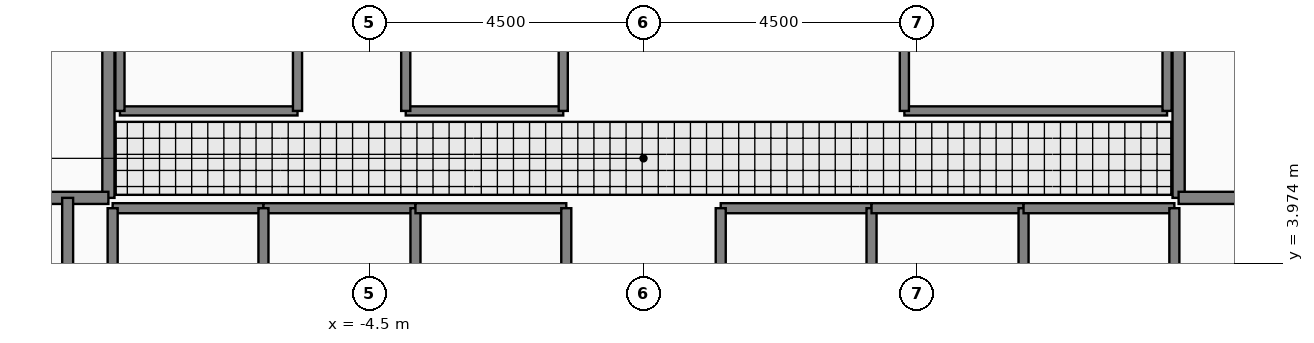
"""IFC4 building model, lengths in metres.
Left out: names, types, materials, properties, quantities, classifications, styles, units other than length and angle.
Written with IfcOpenShell. Run it as: python <this file> out.ifc"""

import sys

from ifc_helpers import new_model, si_unit, direction, frame, frame_2d, origin, place, context, subcontext, project, spatial, rectangle, extrude, element, fill, save


model = new_model("IFC4")
c1 = context("Model", 3, precision=1e-05, world=origin(), true_north=direction((0.0, 1.0)))
c2 = subcontext(c1, "Body", "Model", "MODEL_VIEW")
j1 = project(units=[si_unit("LENGTHUNIT", "METRE"), si_unit("PLANEANGLEUNIT", "RADIAN")], contexts=[c1])
p1 = place(None, origin())
s1 = spatial("IfcSite", under=j1, at=p1, CompositionType="ELEMENT")
p2 = place(p1, origin())
s2 = spatial("IfcBuilding", under=s1, at=p2, CompositionType="ELEMENT")
p3 = place(p2, frame((0.0, 0.0, 27.6)))
s3 = spatial("IfcBuildingStorey", under=s2, at=p3, CompositionType="ELEMENT", Elevation=27.6)
p4 = place(p3, frame((-8.8, 5.05, 0.0), z_axis=(0.0, 0.0, 1.0), x_axis=(0.0, 1.0, 0.0)))
e1 = element("IfcWall", 1, at=p4, inside=s3, PredefinedType="PARTITIONING", context=c2, shape_type="SweptSolid", body=[
    extrude(rectangle(XDim=6.1, YDim=0.2, at=frame_2d((3.05, 0.0))), origin(), (0.0, 0.0, 1.0), 3.43),
])
p5 = place(p4, frame((0.25, 0.0, 0.0)))
e2 = element("IfcOpeningElement", 2, at=p5, cuts=e1, PredefinedType="OPENING", context=c2, shape_type="SweptSolid", body=[
    extrude(rectangle(XDim=1.1, YDim=2.2, at=frame_2d((0.55, 1.1))), frame((0.0, 0.11, 0.0), z_axis=(0.0, -1.0, 0.0), x_axis=(1.0, 0.0, 0.0)), (0.0, 0.0, 1.0), 0.22),
])
p6 = place(p4, frame((3.85, 0.0, 0.0)))
e3 = element("IfcOpeningElement", 3, at=p6, cuts=e1, PredefinedType="OPENING", context=c2, shape_type="SweptSolid", body=[
    extrude(rectangle(XDim=1.1, YDim=2.2, at=frame_2d((0.55, 1.1))), frame((0.0, 0.11, 0.0), z_axis=(0.0, -1.0, 0.0), x_axis=(1.0, 0.0, 0.0)), (0.0, 0.0, 1.0), 0.22),
])
p7 = place(p3, frame((8.8, 11.15, 0.0), z_axis=(0.0, 0.0, 1.0), x_axis=(0.0, -1.0, 0.0)))
e4 = element("IfcWall", 4, at=p7, inside=s3, PredefinedType="PARTITIONING", context=c2, shape_type="SweptSolid", body=[
    extrude(rectangle(XDim=6.1, YDim=0.2, at=frame_2d((3.05, 0.0))), origin(), (0.0, 0.0, 1.0), 3.43),
])
p8 = place(p7, frame((1.15, 0.0, 0.0)))
e5 = element("IfcOpeningElement", 5, at=p8, cuts=e4, PredefinedType="OPENING", context=c2, shape_type="SweptSolid", body=[
    extrude(rectangle(XDim=1.1, YDim=2.2, at=frame_2d((0.55, 1.1))), frame((0.0, 0.11, 0.0), z_axis=(0.0, -1.0, 0.0), x_axis=(1.0, 0.0, 0.0)), (0.0, 0.0, 1.0), 0.22),
])
p9 = place(p7, frame((4.75, 0.0, 0.0)))
e6 = element("IfcOpeningElement", 6, at=p9, cuts=e4, PredefinedType="OPENING", context=c2, shape_type="SweptSolid", body=[
    extrude(rectangle(XDim=1.1, YDim=2.2, at=frame_2d((0.55, 1.1))), frame((0.0, 0.11, 0.0), z_axis=(0.0, -1.0, 0.0), x_axis=(1.0, 0.0, 0.0)), (0.0, 0.0, 1.0), 0.22),
])
p10 = place(p3, frame((-8.73, 4.88, 0.0), z_axis=(0.0, 0.0, 1.0), x_axis=(1.0, 0.0, 0.0)))
e7 = element("IfcWall", 7, at=p10, inside=s3, PredefinedType="PARTITIONING", context=c2, shape_type="SweptSolid", body=[
    extrude(rectangle(XDim=2.48, YDim=0.165, at=frame_2d((1.24, 0.0))), origin(), (0.0, 0.0, 1.0), 3.43),
])
p11 = place(p10, frame((0.69, 0.0, 0.0)))
e8 = element("IfcOpeningElement", 8, at=p11, cuts=e7, PredefinedType="OPENING", context=c2, shape_type="SweptSolid", body=[
    extrude(rectangle(XDim=1.1, YDim=2.25, at=frame_2d((0.55, 1.125))), frame((0.0, 0.093, 0.0), z_axis=(0.0, -1.0, 0.0), x_axis=(1.0, 0.0, 0.0)), (0.0, 0.0, 1.0), 0.185),
])
p12 = place(p3, frame((-6.25, 4.88, 0.0), z_axis=(0.0, 0.0, 1.0), x_axis=(1.0, 0.0, 0.0)))
e9 = element("IfcWall", 9, at=p12, inside=s3, PredefinedType="PARTITIONING", context=c2, shape_type="SweptSolid", body=[
    extrude(rectangle(XDim=2.5, YDim=0.165, at=frame_2d((1.25, 0.0))), origin(), (0.0, 0.0, 1.0), 3.43),
])
p13 = place(p12, frame((0.7, 0.0, 0.0)))
e10 = element("IfcOpeningElement", 10, at=p13, cuts=e9, PredefinedType="OPENING", context=c2, shape_type="SweptSolid", body=[
    extrude(rectangle(XDim=1.1, YDim=2.25, at=frame_2d((0.55, 1.125))), frame((0.0, 0.093, 0.0), z_axis=(0.0, -1.0, 0.0), x_axis=(1.0, 0.0, 0.0)), (0.0, 0.0, 1.0), 0.185),
])
p14 = place(p3, frame((-3.91, 6.48, 0.0), z_axis=(0.0, 0.0, 1.0), x_axis=(1.0, 0.0, 0.0)))
e11 = element("IfcWall", 11, at=p14, inside=s3, PredefinedType="PARTITIONING", context=c2, shape_type="SweptSolid", body=[
    extrude(rectangle(XDim=2.59, YDim=0.15, at=frame_2d((1.295, 0.0))), origin(), (0.0, 0.0, 1.0), 3.43),
])
p15 = place(p14, frame((0.845, 0.0, 0.0)))
e12 = element("IfcOpeningElement", 12, at=p15, cuts=e11, PredefinedType="OPENING", context=c2, shape_type="SweptSolid", body=[
    extrude(rectangle(XDim=0.9, YDim=2.15, at=frame_2d((0.45, 1.075))), frame((0.0, 0.085, 0.0), z_axis=(0.0, -1.0, 0.0), x_axis=(1.0, 0.0, 0.0)), (0.0, 0.0, 1.0), 0.17),
])
p16 = place(p3, frame((4.29, 6.48, 0.0), z_axis=(0.0, 0.0, 1.0), x_axis=(1.0, 0.0, 0.0)))
e13 = element("IfcWall", 13, at=p16, inside=s3, PredefinedType="PARTITIONING", context=c2, shape_type="SweptSolid", body=[
    extrude(rectangle(XDim=4.32, YDim=0.15, at=frame_2d((2.16, 0.0))), origin(), (0.0, 0.0, 1.0), 3.43),
])
p17 = place(p16, frame((1.71, 0.0, 0.0)))
e14 = element("IfcOpeningElement", 14, at=p17, cuts=e13, PredefinedType="OPENING", context=c2, shape_type="SweptSolid", body=[
    extrude(rectangle(XDim=0.9, YDim=2.15, at=frame_2d((0.45, 1.075))), frame((0.0, 0.085, 0.0), z_axis=(0.0, -1.0, 0.0), x_axis=(1.0, 0.0, 0.0)), (0.0, 0.0, 1.0), 0.17),
])
for number, where, z_axis, x_axis in (
    (15, (-11.65, 5.05, 0.0), (0.0, 0.0, 1.0), (1.0, 0.0, 0.0)),
    (16, (8.8, 5.05, 0.0), (0.0, 0.0, 1.0), (1.0, 0.0, 0.0)),
):
    element("IfcWall", number, at=place(p3, frame(where, z_axis=z_axis, x_axis=x_axis)), inside=s3, PredefinedType="PARTITIONING", context=c2, shape_type="SweptSolid", body=[
        extrude(rectangle(XDim=2.85, YDim=0.2, at=frame_2d((1.425, 0.0))), origin(), (0.0, 0.0, 1.0), 3.43),
    ])
for number, where, z_axis, x_axis in (
    (17, (-8.73, 2.52, 0.0), (0.0, 0.0, 1.0), (0.0, 1.0, 0.0)),
    (18, (-6.25, 2.52, 0.0), (0.0, 0.0, 1.0), (0.0, 1.0, 0.0)),
    (19, (-3.75, 2.52, 0.0), (0.0, 0.0, 1.0), (0.0, 1.0, 0.0)),
):
    element("IfcWall", number, at=place(p3, frame(where, z_axis=z_axis, x_axis=x_axis)), inside=s3, PredefinedType="PARTITIONING", context=c2, shape_type="SweptSolid", body=[
        extrude(rectangle(XDim=2.36, YDim=0.165, at=frame_2d((1.18, 0.0))), origin(), (0.0, 0.0, 1.0), 3.43),
    ])
p18 = place(p3, frame((-3.75, 4.88, 0.0), z_axis=(0.0, 0.0, 1.0), x_axis=(1.0, 0.0, 0.0)))
e20 = element("IfcWall", 20, at=p18, inside=s3, PredefinedType="PARTITIONING", context=c2, shape_type="SweptSolid", body=[
    extrude(rectangle(XDim=2.48, YDim=0.165, at=frame_2d((1.24, 0.0))), origin(), (0.0, 0.0, 1.0), 3.43),
])
p19 = place(p3, frame((-1.27, 2.52, 0.0), z_axis=(0.0, 0.0, 1.0), x_axis=(0.0, 1.0, 0.0)))
e21 = element("IfcWall", 21, at=p19, inside=s3, PredefinedType="PARTITIONING", context=c2, shape_type="SweptSolid", body=[
    extrude(rectangle(XDim=2.36, YDim=0.165, at=frame_2d((1.18, 0.0))), origin(), (0.0, 0.0, 1.0), 3.43),
])
p20 = place(p3, frame((1.27, 4.88, 0.0), z_axis=(0.0, 0.0, 1.0), x_axis=(1.0, 0.0, 0.0)))
e22 = element("IfcWall", 22, at=p20, inside=s3, PredefinedType="PARTITIONING", context=c2, shape_type="SweptSolid", body=[
    extrude(rectangle(XDim=2.48, YDim=0.165, at=frame_2d((1.24, 0.0))), origin(), (0.0, 0.0, 1.0), 3.43),
])
for number, where, z_axis, x_axis in (
    (23, (1.27, 2.52, 0.0), (0.0, 0.0, 1.0), (0.0, 1.0, 0.0)),
    (24, (3.75, 2.52, 0.0), (0.0, 0.0, 1.0), (0.0, 1.0, 0.0)),
):
    element("IfcWall", number, at=place(p3, frame(where, z_axis=z_axis, x_axis=x_axis)), inside=s3, PredefinedType="PARTITIONING", context=c2, shape_type="SweptSolid", body=[
        extrude(rectangle(XDim=2.36, YDim=0.165, at=frame_2d((1.18, 0.0))), origin(), (0.0, 0.0, 1.0), 3.43),
    ])
p21 = place(p3, frame((3.75, 4.88, 0.0), z_axis=(0.0, 0.0, 1.0), x_axis=(1.0, 0.0, 0.0)))
e25 = element("IfcWall", 25, at=p21, inside=s3, PredefinedType="PARTITIONING", context=c2, shape_type="SweptSolid", body=[
    extrude(rectangle(XDim=2.5, YDim=0.165, at=frame_2d((1.25, 0.0))), origin(), (0.0, 0.0, 1.0), 3.43),
])
p22 = place(p3, frame((6.25, 2.52, 0.0), z_axis=(0.0, 0.0, 1.0), x_axis=(0.0, 1.0, 0.0)))
e26 = element("IfcWall", 26, at=p22, inside=s3, PredefinedType="PARTITIONING", context=c2, shape_type="SweptSolid", body=[
    extrude(rectangle(XDim=2.36, YDim=0.165, at=frame_2d((1.18, 0.0))), origin(), (0.0, 0.0, 1.0), 3.43),
])
p23 = place(p3, frame((6.25, 4.88, 0.0), z_axis=(0.0, 0.0, 1.0), x_axis=(1.0, 0.0, 0.0)))
e27 = element("IfcWall", 27, at=p23, inside=s3, PredefinedType="PARTITIONING", context=c2, shape_type="SweptSolid", body=[
    extrude(rectangle(XDim=2.48, YDim=0.165, at=frame_2d((1.24, 0.0))), origin(), (0.0, 0.0, 1.0), 3.43),
])
p24 = place(p3, frame((8.73, 2.52, 0.0), z_axis=(0.0, 0.0, 1.0), x_axis=(0.0, 1.0, 0.0)))
e28 = element("IfcWall", 28, at=p24, inside=s3, PredefinedType="PARTITIONING", context=c2, shape_type="SweptSolid", body=[
    extrude(rectangle(XDim=2.36, YDim=0.165, at=frame_2d((1.18, 0.0))), origin(), (0.0, 0.0, 1.0), 3.43),
])
p25 = place(p3, frame((-9.47, 2.45, 0.0), z_axis=(0.0, 0.0, 1.0), x_axis=(0.0, 1.0, 0.0)))
e29 = element("IfcWall", 29, at=p25, inside=s3, PredefinedType="PARTITIONING", context=c2, shape_type="SweptSolid", body=[
    extrude(rectangle(XDim=2.6, YDim=0.18, at=frame_2d((1.3, 0.0))), origin(), (0.0, 0.0, 1.0), 3.43),
])
p26 = place(p3, frame((-8.61, 6.48, 0.0), z_axis=(0.0, 0.0, 1.0), x_axis=(1.0, 0.0, 0.0)))
e30 = element("IfcWall", 30, at=p26, inside=s3, PredefinedType="PARTITIONING", context=c2, shape_type="SweptSolid", body=[
    extrude(rectangle(XDim=2.92, YDim=0.15, at=frame_2d((1.46, 0.0))), origin(), (0.0, 0.0, 1.0), 3.43),
])
for number, where, z_axis, x_axis in (
    (31, (-8.61, 6.48, 0.0), (0.0, 0.0, 1.0), (0.0, 1.0, 0.0)),
    (32, (-5.69, 6.48, 0.0), (0.0, 0.0, 1.0), (0.0, 1.0, 0.0)),
    (33, (-3.91, 6.48, 0.0), (0.0, 0.0, 1.0), (0.0, 1.0, 0.0)),
    (34, (-1.32, 6.48, 0.0), (0.0, 0.0, 1.0), (0.0, 1.0, 0.0)),
    (35, (4.29, 6.48, 0.0), (0.0, 0.0, 1.0), (0.0, 1.0, 0.0)),
    (36, (8.61, 6.48, 0.0), (0.0, 0.0, 1.0), (0.0, 1.0, 0.0)),
):
    element("IfcWall", number, at=place(p3, frame(where, z_axis=z_axis, x_axis=x_axis)), inside=s3, PredefinedType="PARTITIONING", context=c2, shape_type="SweptSolid", body=[
        extrude(rectangle(XDim=2.24, YDim=0.15, at=frame_2d((1.12, 0.0))), origin(), (0.0, 0.0, 1.0), 3.43),
    ])
p27 = place(p5, origin())
e37 = element("IfcDoor", 37, at=p27, inside=s3, OperationType="SINGLE_SWING_LEFT", PredefinedType="DOOR", context=c2, shape_type="SweptSolid", body=[
    extrude(rectangle(XDim=1.1, YDim=2.2, at=frame_2d((0.55, 1.1))), frame((0.0, 0.025, 0.0), z_axis=(0.0, -1.0, 0.0), x_axis=(1.0, 0.0, 0.0)), (0.0, 0.0, 1.0), 0.05),
])
fill(e2, e37)
p28 = place(p9, origin())
e38 = element("IfcDoor", 38, at=p28, inside=s3, OperationType="SINGLE_SWING_RIGHT", PredefinedType="DOOR", context=c2, shape_type="SweptSolid", body=[
    extrude(rectangle(XDim=1.1, YDim=2.2, at=frame_2d((0.55, 1.1))), frame((0.0, 0.025, 0.0), z_axis=(0.0, -1.0, 0.0), x_axis=(1.0, 0.0, 0.0)), (0.0, 0.0, 1.0), 0.05),
])
fill(e6, e38)
p29 = place(p11, origin())
e39 = element("IfcDoor", 39, at=p29, inside=s3, OperationType="SLIDING_TO_LEFT", PredefinedType="DOOR", context=c2, shape_type="SweptSolid", body=[
    extrude(rectangle(XDim=1.1, YDim=2.25, at=frame_2d((0.55, 1.125))), frame((0.0, 0.025, 0.0), z_axis=(0.0, -1.0, 0.0), x_axis=(1.0, 0.0, 0.0)), (0.0, 0.0, 1.0), 0.05),
])
fill(e8, e39)
p30 = place(p13, origin())
e40 = element("IfcDoor", 40, at=p30, inside=s3, OperationType="SLIDING_TO_LEFT", PredefinedType="DOOR", context=c2, shape_type="SweptSolid", body=[
    extrude(rectangle(XDim=1.1, YDim=2.25, at=frame_2d((0.55, 1.125))), frame((0.0, 0.025, 0.0), z_axis=(0.0, -1.0, 0.0), x_axis=(1.0, 0.0, 0.0)), (0.0, 0.0, 1.0), 0.05),
])
fill(e10, e40)
p31 = place(p15, origin())
e41 = element("IfcDoor", 41, at=p31, inside=s3, OperationType="SINGLE_SWING_RIGHT", PredefinedType="DOOR", context=c2, shape_type="SweptSolid", body=[
    extrude(rectangle(XDim=0.9, YDim=2.15, at=frame_2d((0.45, 1.075))), frame((0.0, 0.025, 0.0), z_axis=(0.0, -1.0, 0.0), x_axis=(1.0, 0.0, 0.0)), (0.0, 0.0, 1.0), 0.05),
])
fill(e12, e41)
p32 = place(p17, origin())
e42 = element("IfcDoor", 42, at=p32, inside=s3, OperationType="SINGLE_SWING_LEFT", PredefinedType="DOOR", context=c2, shape_type="SweptSolid", body=[
    extrude(rectangle(XDim=0.9, YDim=2.15, at=frame_2d((0.45, 1.075))), frame((0.0, 0.025, 0.0), z_axis=(0.0, -1.0, 0.0), x_axis=(1.0, 0.0, 0.0)), (0.0, 0.0, 1.0), 0.05),
])
fill(e14, e42)
save(model, sys.argv[1])
